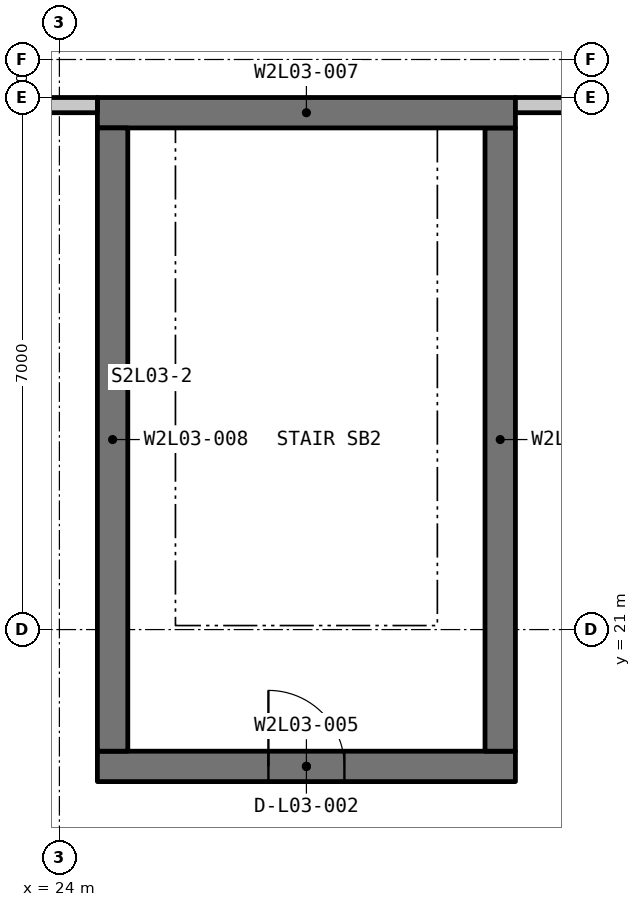
"""IFC4 building model, lengths in metres.
Left out: names, types, materials, properties, quantities, classifications, styles, units other than length and angle.
Written with IfcOpenShell. Run it as: python <this file> out.ifc"""

import sys

from ifc_helpers import new_model, si_unit, direction, frame, frame_2d, origin, place, context, subcontext, project, spatial, rectangle, extrude, element, fill, save


model = new_model("IFC4")
c1 = context("Model", 3, precision=1e-05, world=origin(), true_north=direction((0.0, 1.0)))
c2 = subcontext(c1, "Body", "Model", "MODEL_VIEW")
j1 = project(units=[si_unit("LENGTHUNIT", "METRE"), si_unit("PLANEANGLEUNIT", "RADIAN")], contexts=[c1])
p1 = place(None, origin())
s1 = spatial("IfcSite", under=j1, at=p1, CompositionType="ELEMENT")
p2 = place(p1, origin())
s2 = spatial("IfcBuilding", under=s1, at=p2, CompositionType="ELEMENT")
p3 = place(p2, frame((0.0, 0.0, 15.75)))
s3 = spatial("IfcBuildingStorey", under=s2, at=p3, CompositionType="ELEMENT", Elevation=15.75)
p4 = place(p3, frame((24.5, 19.2, -0.3), z_axis=(0.0, 0.0, 1.0), x_axis=(1.0, 0.0, 0.0)))
e1 = element("IfcWall", 1, at=p4, inside=s3, PredefinedType="SHEAR", context=c2, shape_type="SweptSolid", body=[
    extrude(rectangle(XDim=5.5, YDim=0.4, at=frame_2d((2.75, 0.0))), origin(), (0.0, 0.0, 1.0), 3.05),
])
p5 = place(p4, frame((2.25, 0.0, 0.3)))
e2 = element("IfcOpeningElement", 2, at=p5, cuts=e1, PredefinedType="OPENING", context=c2, shape_type="SweptSolid", body=[
    extrude(rectangle(XDim=1.0, YDim=2.2, at=frame_2d((0.5, 1.1))), frame((0.0, 0.21, 0.0), z_axis=(0.0, -1.0, 0.0), x_axis=(1.0, 0.0, 0.0)), (0.0, 0.0, 1.0), 0.42),
])
p6 = place(p3, frame((29.8, 19.4, -0.3), z_axis=(0.0, 0.0, 1.0), x_axis=(0.0, 1.0, 0.0)))
e3 = element("IfcWall", 3, at=p6, inside=s3, PredefinedType="SHEAR", context=c2, shape_type="SweptSolid", body=[
    extrude(rectangle(XDim=8.2, YDim=0.4, at=frame_2d((4.1, 0.0))), origin(), (0.0, 0.0, 1.0), 3.05),
])
p7 = place(p3, frame((24.5, 27.8, -0.3), z_axis=(0.0, 0.0, 1.0), x_axis=(1.0, 0.0, 0.0)))
e4 = element("IfcWall", 4, at=p7, inside=s3, PredefinedType="SHEAR", context=c2, shape_type="SweptSolid", body=[
    extrude(rectangle(XDim=5.5, YDim=0.4, at=frame_2d((2.75, 0.0))), origin(), (0.0, 0.0, 1.0), 3.05),
])
p8 = place(p3, frame((24.7, 19.4, -0.3), z_axis=(0.0, 0.0, 1.0), x_axis=(0.0, 1.0, 0.0)))
e5 = element("IfcWall", 5, at=p8, inside=s3, PredefinedType="SHEAR", context=c2, shape_type="SweptSolid", body=[
    extrude(rectangle(XDim=8.2, YDim=0.4, at=frame_2d((4.1, 0.0))), origin(), (0.0, 0.0, 1.0), 3.05),
])
p9 = place(p3, frame((21.551, 27.9, 0.0), z_axis=(0.0, 0.0, 1.0), x_axis=(1.0, 0.0, 0.0)))
e6 = element("IfcWall", 6, at=p9, inside=s3, PredefinedType="PARAPET", context=c2, shape_type="SweptSolid", body=[
    extrude(rectangle(XDim=2.949, YDim=0.2, at=frame_2d((1.475, 0.0))), origin(), (0.0, 0.0, 1.0), 1.2),
])
p10 = place(p3, frame((30.0, 27.9, 0.0), z_axis=(0.0, 0.0, 1.0), x_axis=(1.0, 0.0, 0.0)))
e7 = element("IfcWall", 7, at=p10, inside=s3, PredefinedType="PARAPET", context=c2, shape_type="SweptSolid", body=[
    extrude(rectangle(XDim=9.635, YDim=0.2, at=frame_2d((4.818, 0.0))), origin(), (0.0, 0.0, 1.0), 1.2),
])
p11 = place(p5, origin())
e8 = element("IfcDoor", 8, at=p11, inside=s3, OperationType="SINGLE_SWING_LEFT", PredefinedType="DOOR", context=c2, shape_type="SweptSolid", body=[
    extrude(rectangle(XDim=1.0, YDim=2.2, at=frame_2d((0.5, 1.1))), frame((0.0, 0.025, 0.0), z_axis=(0.0, -1.0, 0.0), x_axis=(1.0, 0.0, 0.0)), (0.0, 0.0, 1.0), 0.05),
])
fill(e2, e8)
save(model, sys.argv[1])
